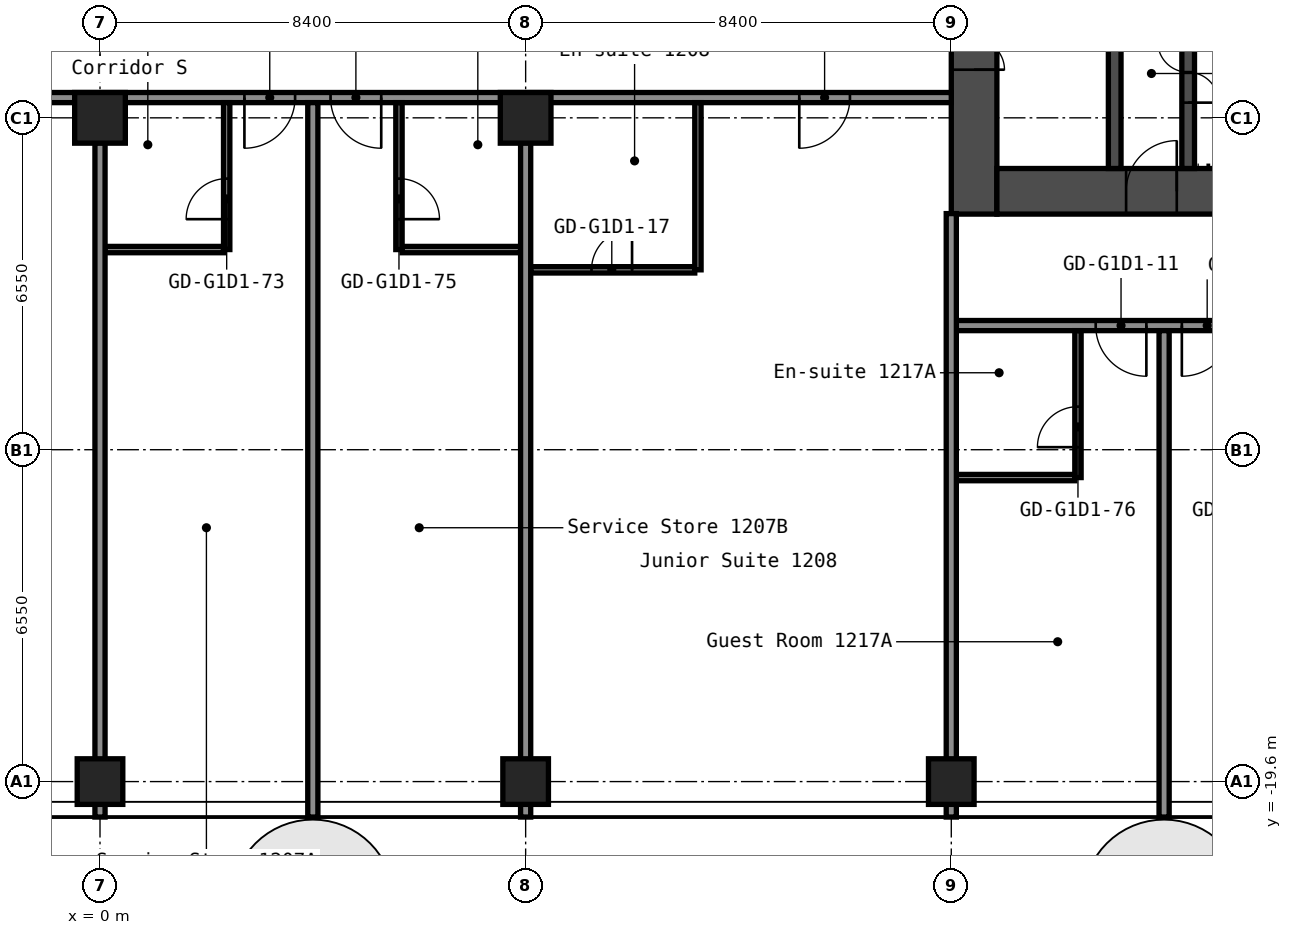
"""IFC4 building model, lengths in metres.
Left out: names, types, materials, properties, quantities, classifications, styles, units other than length and angle.
Written with IfcOpenShell. Run it as: python <this file> out.ifc"""

import sys

from ifc_helpers import new_model, si_unit, direction, frame, frame_2d, origin, origin_2d, place, context, subcontext, project, spatial, rectangle, hollow_rectangle, extrude, element, fill, save


model = new_model("IFC4")
c1 = context("Model", 3, precision=1e-05, world=origin(), true_north=direction((0.0, 1.0)))
c2 = subcontext(c1, "Body", "Model", "MODEL_VIEW")
j1 = project(units=[si_unit("LENGTHUNIT", "METRE"), si_unit("PLANEANGLEUNIT", "RADIAN")], contexts=[c1])
p1 = place(None, origin())
s1 = spatial("IfcSite", under=j1, at=p1, CompositionType="ELEMENT")
p2 = place(p1, origin())
s2 = spatial("IfcBuilding", under=s1, at=p2, CompositionType="ELEMENT")
p3 = place(p2, frame((0.0, 0.0, 45.4)))
s3 = spatial("IfcBuildingStorey", under=s2, at=p3, CompositionType="ELEMENT", Elevation=45.4)
p4 = place(p3, frame((0.0, -19.6, 0.0), z_axis=(0.0, 0.0, 1.0), x_axis=(1.0, 0.0, 0.0)))
e1 = element("IfcColumn", 1, at=p4, inside=s3, PredefinedType="COLUMN", context=c2, shape_type="SweptSolid", body=[
    extrude(hollow_rectangle(XDim=0.9, YDim=0.9, WallThickness=0.036, at=origin_2d()), origin(), (0.0, 0.0, 1.0), 2.8),
])
p5 = place(p3, frame((0.0, -6.5, 0.0), z_axis=(0.0, 0.0, 1.0), x_axis=(1.0, 0.0, 0.0)))
e2 = element("IfcColumn", 2, at=p5, inside=s3, PredefinedType="COLUMN", context=c2, shape_type="SweptSolid", body=[
    extrude(hollow_rectangle(XDim=1.0, YDim=1.0, WallThickness=0.04, at=origin_2d()), origin(), (0.0, 0.0, 1.0), 2.8),
])
p6 = place(p3, frame((8.4, -19.6, 0.0), z_axis=(0.0, 0.0, 1.0), x_axis=(1.0, 0.0, 0.0)))
e3 = element("IfcColumn", 3, at=p6, inside=s3, PredefinedType="COLUMN", context=c2, shape_type="SweptSolid", body=[
    extrude(hollow_rectangle(XDim=0.9, YDim=0.9, WallThickness=0.036, at=origin_2d()), origin(), (0.0, 0.0, 1.0), 2.8),
])
p7 = place(p3, frame((8.4, -6.5, 0.0), z_axis=(0.0, 0.0, 1.0), x_axis=(1.0, 0.0, 0.0)))
e4 = element("IfcColumn", 4, at=p7, inside=s3, PredefinedType="COLUMN", context=c2, shape_type="SweptSolid", body=[
    extrude(hollow_rectangle(XDim=1.0, YDim=1.0, WallThickness=0.04, at=origin_2d()), origin(), (0.0, 0.0, 1.0), 2.8),
])
p8 = place(p3, frame((16.8, -19.6, 0.0), z_axis=(0.0, 0.0, 1.0), x_axis=(1.0, 0.0, 0.0)))
e5 = element("IfcColumn", 5, at=p8, inside=s3, PredefinedType="COLUMN", context=c2, shape_type="SweptSolid", body=[
    extrude(hollow_rectangle(XDim=0.9, YDim=0.9, WallThickness=0.036, at=origin_2d()), origin(), (0.0, 0.0, 1.0), 2.8),
])
p9 = place(p3, frame((17.25, -8.4, 0.0), z_axis=(0.0, 0.0, 1.0), x_axis=(0.0, 1.0, 0.0)))
e6 = element("IfcWall", 6, at=p9, inside=s3, PredefinedType="SHEAR", context=c2, shape_type="SweptSolid", body=[
    extrude(rectangle(XDim=16.8, YDim=0.9, at=frame_2d((8.4, 0.0))), origin(), (0.0, 0.0, 1.0), 2.8),
])
p10 = place(p9, frame((12.75, 0.0, 0.0)))
e7 = element("IfcOpeningElement", 7, at=p10, cuts=e6, PredefinedType="OPENING", context=c2, shape_type="SweptSolid", body=[
    extrude(rectangle(XDim=1.2, YDim=2.1, at=frame_2d((0.6, 1.05))), frame((0.0, 0.46, 0.0), z_axis=(0.0, -1.0, 0.0), x_axis=(1.0, 0.0, 0.0)), (0.0, 0.0, 1.0), 0.92),
])
p11 = place(p9, frame((2.85, 0.0, 0.0)))
e8 = element("IfcOpeningElement", 8, at=p11, cuts=e6, PredefinedType="OPENING", context=c2, shape_type="SweptSolid", body=[
    extrude(rectangle(XDim=1.2, YDim=2.1, at=frame_2d((0.6, 1.05))), frame((0.0, 0.46, 0.0), z_axis=(0.0, -1.0, 0.0), x_axis=(1.0, 0.0, 0.0)), (0.0, 0.0, 1.0), 0.92),
])
p12 = place(p3, frame((17.7, -7.95, 0.0), z_axis=(0.0, 0.0, 1.0), x_axis=(1.0, 0.0, 0.0)))
e9 = element("IfcWall", 9, at=p12, inside=s3, PredefinedType="SHEAR", context=c2, shape_type="SweptSolid", body=[
    extrude(rectangle(XDim=15.0, YDim=0.9, at=frame_2d((7.5, 0.0))), origin(), (0.0, 0.0, 1.0), 2.8),
])
p13 = place(p12, frame((2.55, 0.0, 0.0)))
e10 = element("IfcOpeningElement", 10, at=p13, cuts=e9, PredefinedType="OPENING", context=c2, shape_type="SweptSolid", body=[
    extrude(rectangle(XDim=1.0, YDim=2.1, at=frame_2d((0.5, 1.05))), frame((0.0, 0.46, 0.0), z_axis=(0.0, -1.0, 0.0), x_axis=(1.0, 0.0, 0.0)), (0.0, 0.0, 1.0), 0.92),
])
p14 = place(p3, frame((20.025, -7.5, 0.0), z_axis=(0.0, 0.0, 1.0), x_axis=(0.0, 1.0, 0.0)))
e11 = element("IfcWall", 11, at=p14, inside=s3, PredefinedType="SHEAR", context=c2, shape_type="SweptSolid", body=[
    extrude(rectangle(XDim=6.3, YDim=0.25, at=frame_2d((3.15, 0.0))), origin(), (0.0, 0.0, 1.0), 2.8),
])
p15 = place(p14, frame((2.4, 0.0, 0.0)))
e12 = element("IfcOpeningElement", 12, at=p15, cuts=e11, PredefinedType="OPENING", context=c2, shape_type="SweptSolid", body=[
    extrude(rectangle(XDim=1.0, YDim=2.1, at=frame_2d((0.5, 1.05))), frame((0.0, 0.135, 0.0), z_axis=(0.0, -1.0, 0.0), x_axis=(1.0, 0.0, 0.0)), (0.0, 0.0, 1.0), 0.27),
])
p16 = place(p3, frame((21.475, -7.5, 0.0), z_axis=(0.0, 0.0, 1.0), x_axis=(0.0, 1.0, 0.0)))
e13 = element("IfcWall", 13, at=p16, inside=s3, PredefinedType="SHEAR", context=c2, shape_type="SweptSolid", body=[
    extrude(rectangle(XDim=3.75, YDim=0.25, at=frame_2d((1.875, 0.0))), origin(), (0.0, 0.0, 1.0), 2.8),
])
p17 = place(p16, frame((1.3, 0.0, 0.0)))
e14 = element("IfcOpeningElement", 14, at=p17, cuts=e13, PredefinedType="OPENING", context=c2, shape_type="SweptSolid", body=[
    extrude(rectangle(XDim=1.2, YDim=2.1, at=frame_2d((0.6, 1.05))), frame((0.0, 0.135, 0.0), z_axis=(0.0, -1.0, 0.0), x_axis=(1.0, 0.0, 0.0)), (0.0, 0.0, 1.0), 0.27),
])
p18 = place(p3, frame((16.9, -13.6, 0.0), z_axis=(0.0, 0.0, 1.0), x_axis=(1.0, 0.0, 0.0)))
e15 = element("IfcWall", 15, at=p18, inside=s3, PredefinedType="PARTITIONING", context=c2, shape_type="SweptSolid", body=[
    extrude(rectangle(XDim=2.338, YDim=0.125, at=frame_2d((1.169, 0.0))), origin(), (0.0, 0.0, 1.0), 2.8),
])
p19 = place(p3, frame((16.8, -10.6, 0.0), z_axis=(0.0, 0.0, 1.0), x_axis=(1.0, 0.0, 0.0)))
e16 = element("IfcWall", 16, at=p19, inside=s3, PredefinedType="PARTITIONING", context=c2, shape_type="SweptSolid", body=[
    extrude(rectangle(XDim=34.3, YDim=0.2, at=frame_2d((17.15, 0.0))), origin(), (0.0, 0.0, 1.0), 2.8),
])
p20 = place(p19, frame((2.85, 0.0, 0.0)))
e17 = element("IfcOpeningElement", 17, at=p20, cuts=e16, PredefinedType="OPENING", context=c2, shape_type="SweptSolid", body=[
    extrude(rectangle(XDim=1.0, YDim=2.1, at=frame_2d((0.5, 1.05))), frame((0.0, 0.11, 0.0), z_axis=(0.0, -1.0, 0.0), x_axis=(1.0, 0.0, 0.0)), (0.0, 0.0, 1.0), 0.22),
])
p21 = place(p19, frame((4.55, 0.0, 0.0)))
e18 = element("IfcOpeningElement", 18, at=p21, cuts=e16, PredefinedType="OPENING", context=c2, shape_type="SweptSolid", body=[
    extrude(rectangle(XDim=1.0, YDim=2.1, at=frame_2d((0.5, 1.05))), frame((0.0, 0.11, 0.0), z_axis=(0.0, -1.0, 0.0), x_axis=(1.0, 0.0, 0.0)), (0.0, 0.0, 1.0), 0.22),
])
p22 = place(p19, frame((10.4, 0.0, 0.0)))
e19 = element("IfcOpeningElement", 19, at=p22, cuts=e16, PredefinedType="OPENING", context=c2, shape_type="SweptSolid", body=[
    extrude(rectangle(XDim=1.0, YDim=2.1, at=frame_2d((0.5, 1.05))), frame((0.0, 0.11, 0.0), z_axis=(0.0, -1.0, 0.0), x_axis=(1.0, 0.0, 0.0)), (0.0, 0.0, 1.0), 0.22),
])
p23 = place(p19, frame((19.65, 0.0, 0.0)))
e20 = element("IfcOpeningElement", 20, at=p23, cuts=e16, PredefinedType="OPENING", context=c2, shape_type="SweptSolid", body=[
    extrude(rectangle(XDim=1.0, YDim=2.1, at=frame_2d((0.5, 1.05))), frame((0.0, 0.11, 0.0), z_axis=(0.0, -1.0, 0.0), x_axis=(1.0, 0.0, 0.0)), (0.0, 0.0, 1.0), 0.22),
])
p24 = place(p19, frame((21.35, 0.0, 0.0)))
e21 = element("IfcOpeningElement", 21, at=p24, cuts=e16, PredefinedType="OPENING", context=c2, shape_type="SweptSolid", body=[
    extrude(rectangle(XDim=1.0, YDim=2.1, at=frame_2d((0.5, 1.05))), frame((0.0, 0.11, 0.0), z_axis=(0.0, -1.0, 0.0), x_axis=(1.0, 0.0, 0.0)), (0.0, 0.0, 1.0), 0.22),
])
p25 = place(p19, frame((30.8, 0.0, 0.0)))
e22 = element("IfcOpeningElement", 22, at=p25, cuts=e16, PredefinedType="OPENING", context=c2, shape_type="SweptSolid", body=[
    extrude(rectangle(XDim=1.0, YDim=2.1, at=frame_2d((0.5, 1.05))), frame((0.0, 0.11, 0.0), z_axis=(0.0, -1.0, 0.0), x_axis=(1.0, 0.0, 0.0)), (0.0, 0.0, 1.0), 0.22),
])
p26 = place(p3, frame((8.5, -9.5, 0.0), z_axis=(0.0, 0.0, 1.0), x_axis=(1.0, 0.0, 0.0)))
e23 = element("IfcWall", 23, at=p26, inside=s3, PredefinedType="PARTITIONING", context=c2, shape_type="SweptSolid", body=[
    extrude(rectangle(XDim=3.238, YDim=0.125, at=frame_2d((1.619, 0.0))), origin(), (0.0, 0.0, 1.0), 2.8),
])
p27 = place(p26, frame((1.2, 0.0, 0.0)))
e24 = element("IfcOpeningElement", 24, at=p27, cuts=e23, PredefinedType="OPENING", context=c2, shape_type="SweptSolid", body=[
    extrude(rectangle(XDim=0.8, YDim=2.1, at=frame_2d((0.4, 1.05))), frame((0.0, 0.073, 0.0), z_axis=(0.0, -1.0, 0.0), x_axis=(1.0, 0.0, 0.0)), (0.0, 0.0, 1.0), 0.145),
])
p28 = place(p3, frame((0.1, -9.1, 0.0), z_axis=(0.0, 0.0, 1.0), x_axis=(1.0, 0.0, 0.0)))
e25 = element("IfcWall", 25, at=p28, inside=s3, PredefinedType="PARTITIONING", context=c2, shape_type="SweptSolid", body=[
    extrude(rectangle(XDim=2.337, YDim=0.125, at=frame_2d((1.169, 0.0))), origin(), (0.0, 0.0, 1.0), 2.8),
])
p29 = place(p3, frame((5.962, -9.1, 0.0), z_axis=(0.0, 0.0, 1.0), x_axis=(1.0, 0.0, 0.0)))
e26 = element("IfcWall", 26, at=p29, inside=s3, PredefinedType="PARTITIONING", context=c2, shape_type="SweptSolid", body=[
    extrude(rectangle(XDim=2.338, YDim=0.125, at=frame_2d((1.169, 0.0))), origin(), (0.0, 0.0, 1.0), 2.8),
])
p30 = place(p3, frame((-16.8, -6.1, 0.0), z_axis=(0.0, 0.0, 1.0), x_axis=(1.0, 0.0, 0.0)))
e27 = element("IfcWall", 27, at=p30, inside=s3, PredefinedType="PARTITIONING", context=c2, shape_type="SweptSolid", body=[
    extrude(rectangle(XDim=33.6, YDim=0.2, at=frame_2d((16.8, 0.0))), origin(), (0.0, 0.0, 1.0), 2.8),
])
p31 = place(p30, frame((2.85, 0.0, 0.0)))
e28 = element("IfcOpeningElement", 28, at=p31, cuts=e27, PredefinedType="OPENING", context=c2, shape_type="SweptSolid", body=[
    extrude(rectangle(XDim=1.0, YDim=2.1, at=frame_2d((0.5, 1.05))), frame((0.0, 0.11, 0.0), z_axis=(0.0, -1.0, 0.0), x_axis=(1.0, 0.0, 0.0)), (0.0, 0.0, 1.0), 0.22),
])
p32 = place(p30, frame((4.55, 0.0, 0.0)))
e29 = element("IfcOpeningElement", 29, at=p32, cuts=e27, PredefinedType="OPENING", context=c2, shape_type="SweptSolid", body=[
    extrude(rectangle(XDim=1.0, YDim=2.1, at=frame_2d((0.5, 1.05))), frame((0.0, 0.11, 0.0), z_axis=(0.0, -1.0, 0.0), x_axis=(1.0, 0.0, 0.0)), (0.0, 0.0, 1.0), 0.22),
])
p33 = place(p30, frame((10.3, 0.0, 0.0)))
e30 = element("IfcOpeningElement", 30, at=p33, cuts=e27, PredefinedType="OPENING", context=c2, shape_type="SweptSolid", body=[
    extrude(rectangle(XDim=0.9, YDim=2.1, at=frame_2d((0.45, 1.05))), frame((0.0, 0.11, 0.0), z_axis=(0.0, -1.0, 0.0), x_axis=(1.0, 0.0, 0.0)), (0.0, 0.0, 1.0), 0.22),
])
p34 = place(p30, frame((14.5, 0.0, 0.0)))
e31 = element("IfcOpeningElement", 31, at=p34, cuts=e27, PredefinedType="OPENING", context=c2, shape_type="SweptSolid", body=[
    extrude(rectangle(XDim=0.9, YDim=2.1, at=frame_2d((0.45, 1.05))), frame((0.0, 0.11, 0.0), z_axis=(0.0, -1.0, 0.0), x_axis=(1.0, 0.0, 0.0)), (0.0, 0.0, 1.0), 0.22),
])
p35 = place(p30, frame((19.65, 0.0, 0.0)))
e32 = element("IfcOpeningElement", 32, at=p35, cuts=e27, PredefinedType="OPENING", context=c2, shape_type="SweptSolid", body=[
    extrude(rectangle(XDim=1.0, YDim=2.1, at=frame_2d((0.5, 1.05))), frame((0.0, 0.11, 0.0), z_axis=(0.0, -1.0, 0.0), x_axis=(1.0, 0.0, 0.0)), (0.0, 0.0, 1.0), 0.22),
])
p36 = place(p30, frame((21.35, 0.0, 0.0)))
e33 = element("IfcOpeningElement", 33, at=p36, cuts=e27, PredefinedType="OPENING", context=c2, shape_type="SweptSolid", body=[
    extrude(rectangle(XDim=1.0, YDim=2.1, at=frame_2d((0.5, 1.05))), frame((0.0, 0.11, 0.0), z_axis=(0.0, -1.0, 0.0), x_axis=(1.0, 0.0, 0.0)), (0.0, 0.0, 1.0), 0.22),
])
p37 = place(p30, frame((30.6, 0.0, 0.0)))
e34 = element("IfcOpeningElement", 34, at=p37, cuts=e27, PredefinedType="OPENING", context=c2, shape_type="SweptSolid", body=[
    extrude(rectangle(XDim=1.0, YDim=2.1, at=frame_2d((0.5, 1.05))), frame((0.0, 0.11, 0.0), z_axis=(0.0, -1.0, 0.0), x_axis=(1.0, 0.0, 0.0)), (0.0, 0.0, 1.0), 0.22),
])
p38 = place(p3, frame((0.0, -20.3, 0.0), z_axis=(0.0, 0.0, 1.0), x_axis=(0.0, 1.0, 0.0)))
e35 = element("IfcWall", 35, at=p38, inside=s3, PredefinedType="PARTITIONING", context=c2, shape_type="SweptSolid", body=[
    extrude(rectangle(XDim=13.31, YDim=0.2, at=frame_2d((6.655, 0.0))), origin(), (0.0, 0.0, 1.0), 2.8),
])
p39 = place(p3, frame((2.5, -9.1, 0.0), z_axis=(0.0, 0.0, 1.0), x_axis=(0.0, 1.0, 0.0)))
e36 = element("IfcWall", 36, at=p39, inside=s3, PredefinedType="PARTITIONING", context=c2, shape_type="SweptSolid", body=[
    extrude(rectangle(XDim=2.9, YDim=0.125, at=frame_2d((1.45, 0.0))), origin(), (0.0, 0.0, 1.0), 2.8),
])
p40 = place(p39, frame((0.6, 0.0, 0.0)))
e37 = element("IfcOpeningElement", 37, at=p40, cuts=e36, PredefinedType="OPENING", context=c2, shape_type="SweptSolid", body=[
    extrude(rectangle(XDim=0.8, YDim=2.1, at=frame_2d((0.4, 1.05))), frame((0.0, 0.073, 0.0), z_axis=(0.0, -1.0, 0.0), x_axis=(1.0, 0.0, 0.0)), (0.0, 0.0, 1.0), 0.145),
])
p41 = place(p3, frame((4.2, -20.3, 0.0), z_axis=(0.0, 0.0, 1.0), x_axis=(0.0, 1.0, 0.0)))
e38 = element("IfcWall", 38, at=p41, inside=s3, PredefinedType="PARTITIONING", context=c2, shape_type="SweptSolid", body=[
    extrude(rectangle(XDim=14.1, YDim=0.2, at=frame_2d((7.05, 0.0))), origin(), (0.0, 0.0, 1.0), 2.8),
])
p42 = place(p3, frame((5.9, -9.1, 0.0), z_axis=(0.0, 0.0, 1.0), x_axis=(0.0, 1.0, 0.0)))
e39 = element("IfcWall", 39, at=p42, inside=s3, PredefinedType="PARTITIONING", context=c2, shape_type="SweptSolid", body=[
    extrude(rectangle(XDim=2.9, YDim=0.125, at=frame_2d((1.45, 0.0))), origin(), (0.0, 0.0, 1.0), 2.8),
])
p43 = place(p42, frame((0.6, 0.0, 0.0)))
e40 = element("IfcOpeningElement", 40, at=p43, cuts=e39, PredefinedType="OPENING", context=c2, shape_type="SweptSolid", body=[
    extrude(rectangle(XDim=0.8, YDim=2.1, at=frame_2d((0.4, 1.05))), frame((0.0, 0.073, 0.0), z_axis=(0.0, -1.0, 0.0), x_axis=(1.0, 0.0, 0.0)), (0.0, 0.0, 1.0), 0.145),
])
p44 = place(p3, frame((8.4, -20.3, 0.0), z_axis=(0.0, 0.0, 1.0), x_axis=(0.0, 1.0, 0.0)))
e41 = element("IfcWall", 41, at=p44, inside=s3, PredefinedType="PARTITIONING", context=c2, shape_type="SweptSolid", body=[
    extrude(rectangle(XDim=13.31, YDim=0.2, at=frame_2d((6.655, 0.0))), origin(), (0.0, 0.0, 1.0), 2.8),
])
p45 = place(p3, frame((11.8, -9.5, 0.0), z_axis=(0.0, 0.0, 1.0), x_axis=(0.0, 1.0, 0.0)))
e42 = element("IfcWall", 42, at=p45, inside=s3, PredefinedType="PARTITIONING", context=c2, shape_type="SweptSolid", body=[
    extrude(rectangle(XDim=3.3, YDim=0.125, at=frame_2d((1.65, 0.0))), origin(), (0.0, 0.0, 1.0), 2.8),
])
p46 = place(p3, frame((16.8, -20.3, 0.0), z_axis=(0.0, 0.0, 1.0), x_axis=(0.0, 1.0, 0.0)))
e43 = element("IfcWall", 43, at=p46, inside=s3, PredefinedType="PARTITIONING", context=c2, shape_type="SweptSolid", body=[
    extrude(rectangle(XDim=11.91, YDim=0.2, at=frame_2d((5.955, 0.0))), origin(), (0.0, 0.0, 1.0), 2.8),
])
p47 = place(p3, frame((19.3, -13.6, 0.0), z_axis=(0.0, 0.0, 1.0), x_axis=(0.0, 1.0, 0.0)))
e44 = element("IfcWall", 44, at=p47, inside=s3, PredefinedType="PARTITIONING", context=c2, shape_type="SweptSolid", body=[
    extrude(rectangle(XDim=2.9, YDim=0.125, at=frame_2d((1.45, 0.0))), origin(), (0.0, 0.0, 1.0), 2.8),
])
p48 = place(p47, frame((0.6, 0.0, 0.0)))
e45 = element("IfcOpeningElement", 45, at=p48, cuts=e44, PredefinedType="OPENING", context=c2, shape_type="SweptSolid", body=[
    extrude(rectangle(XDim=0.8, YDim=2.1, at=frame_2d((0.4, 1.05))), frame((0.0, 0.073, 0.0), z_axis=(0.0, -1.0, 0.0), x_axis=(1.0, 0.0, 0.0)), (0.0, 0.0, 1.0), 0.145),
])
p49 = place(p3, frame((21.0, -20.3, 0.0), z_axis=(0.0, 0.0, 1.0), x_axis=(0.0, 1.0, 0.0)))
e46 = element("IfcWall", 46, at=p49, inside=s3, PredefinedType="PARTITIONING", context=c2, shape_type="SweptSolid", body=[
    extrude(rectangle(XDim=9.6, YDim=0.2, at=frame_2d((4.8, 0.0))), origin(), (0.0, 0.0, 1.0), 2.8),
])
p50 = place(p11, origin())
e47 = element("IfcDoor", 47, at=p50, inside=s3, OperationType="DOUBLE_DOOR_SINGLE_SWING", PredefinedType="DOOR", context=c2, shape_type="SweptSolid", body=[
    extrude(rectangle(XDim=1.2, YDim=2.1, at=frame_2d((0.6, 1.05))), frame((0.0, 0.025, 0.0), z_axis=(0.0, -1.0, 0.0), x_axis=(1.0, 0.0, 0.0)), (0.0, 0.0, 1.0), 0.05),
])
fill(e8, e47)
p51 = place(p13, origin())
e48 = element("IfcDoor", 48, at=p51, inside=s3, OperationType="SINGLE_SWING_LEFT", PredefinedType="DOOR", context=c2, shape_type="SweptSolid", body=[
    extrude(rectangle(XDim=1.0, YDim=2.1, at=frame_2d((0.5, 1.05))), frame((0.0, 0.025, 0.0), z_axis=(0.0, -1.0, 0.0), x_axis=(1.0, 0.0, 0.0)), (0.0, 0.0, 1.0), 0.05),
])
fill(e10, e48)
p52 = place(p17, origin())
e49 = element("IfcDoor", 49, at=p52, inside=s3, OperationType="DOUBLE_DOOR_SINGLE_SWING", PredefinedType="DOOR", context=c2, shape_type="SweptSolid", body=[
    extrude(rectangle(XDim=1.2, YDim=2.1, at=frame_2d((0.6, 1.05))), frame((0.0, 0.025, 0.0), z_axis=(0.0, -1.0, 0.0), x_axis=(1.0, 0.0, 0.0)), (0.0, 0.0, 1.0), 0.05),
])
fill(e14, e49)
p53 = place(p20, origin())
e50 = element("IfcDoor", 50, at=p53, inside=s3, OperationType="SINGLE_SWING_RIGHT", PredefinedType="DOOR", context=c2, shape_type="SweptSolid", body=[
    extrude(rectangle(XDim=1.0, YDim=2.1, at=frame_2d((0.5, 1.05))), frame((0.0, 0.025, 0.0), z_axis=(0.0, -1.0, 0.0), x_axis=(1.0, 0.0, 0.0)), (0.0, 0.0, 1.0), 0.05),
])
fill(e17, e50)
p54 = place(p21, origin())
e51 = element("IfcDoor", 51, at=p54, inside=s3, OperationType="SINGLE_SWING_LEFT", PredefinedType="DOOR", context=c2, shape_type="SweptSolid", body=[
    extrude(rectangle(XDim=1.0, YDim=2.1, at=frame_2d((0.5, 1.05))), frame((0.0, 0.025, 0.0), z_axis=(0.0, -1.0, 0.0), x_axis=(1.0, 0.0, 0.0)), (0.0, 0.0, 1.0), 0.05),
])
fill(e18, e51)
p55 = place(p27, origin())
e52 = element("IfcDoor", 52, at=p55, inside=s3, OperationType="SINGLE_SWING_LEFT", PredefinedType="DOOR", context=c2, shape_type="SweptSolid", body=[
    extrude(rectangle(XDim=0.8, YDim=2.1, at=frame_2d((0.4, 1.05))), frame((0.0, 0.025, 0.0), z_axis=(0.0, -1.0, 0.0), x_axis=(1.0, 0.0, 0.0)), (0.0, 0.0, 1.0), 0.05),
])
fill(e24, e52)
p56 = place(p35, origin())
e53 = element("IfcDoor", 53, at=p56, inside=s3, OperationType="SINGLE_SWING_LEFT", PredefinedType="DOOR", context=c2, shape_type="SweptSolid", body=[
    extrude(rectangle(XDim=1.0, YDim=2.1, at=frame_2d((0.5, 1.05))), frame((0.0, 0.025, 0.0), z_axis=(0.0, -1.0, 0.0), x_axis=(1.0, 0.0, 0.0)), (0.0, 0.0, 1.0), 0.05),
])
fill(e32, e53)
p57 = place(p36, origin())
e54 = element("IfcDoor", 54, at=p57, inside=s3, OperationType="SINGLE_SWING_RIGHT", PredefinedType="DOOR", context=c2, shape_type="SweptSolid", body=[
    extrude(rectangle(XDim=1.0, YDim=2.1, at=frame_2d((0.5, 1.05))), frame((0.0, 0.025, 0.0), z_axis=(0.0, -1.0, 0.0), x_axis=(1.0, 0.0, 0.0)), (0.0, 0.0, 1.0), 0.05),
])
fill(e33, e54)
p58 = place(p37, origin())
e55 = element("IfcDoor", 55, at=p58, inside=s3, OperationType="SINGLE_SWING_LEFT", PredefinedType="DOOR", context=c2, shape_type="SweptSolid", body=[
    extrude(rectangle(XDim=1.0, YDim=2.1, at=frame_2d((0.5, 1.05))), frame((0.0, 0.025, 0.0), z_axis=(0.0, -1.0, 0.0), x_axis=(1.0, 0.0, 0.0)), (0.0, 0.0, 1.0), 0.05),
])
fill(e34, e55)
p59 = place(p40, origin())
e56 = element("IfcDoor", 56, at=p59, inside=s3, OperationType="SINGLE_SWING_RIGHT", PredefinedType="DOOR", context=c2, shape_type="SweptSolid", body=[
    extrude(rectangle(XDim=0.8, YDim=2.1, at=frame_2d((0.4, 1.05))), frame((0.0, 0.025, 0.0), z_axis=(0.0, -1.0, 0.0), x_axis=(1.0, 0.0, 0.0)), (0.0, 0.0, 1.0), 0.05),
])
fill(e37, e56)
p60 = place(p43, origin())
e57 = element("IfcDoor", 57, at=p60, inside=s3, OperationType="SINGLE_SWING_LEFT", PredefinedType="DOOR", context=c2, shape_type="SweptSolid", body=[
    extrude(rectangle(XDim=0.8, YDim=2.1, at=frame_2d((0.4, 1.05))), frame((0.0, 0.025, 0.0), z_axis=(0.0, -1.0, 0.0), x_axis=(1.0, 0.0, 0.0)), (0.0, 0.0, 1.0), 0.05),
])
fill(e40, e57)
p61 = place(p48, origin())
e58 = element("IfcDoor", 58, at=p61, inside=s3, OperationType="SINGLE_SWING_RIGHT", PredefinedType="DOOR", context=c2, shape_type="SweptSolid", body=[
    extrude(rectangle(XDim=0.8, YDim=2.1, at=frame_2d((0.4, 1.05))), frame((0.0, 0.025, 0.0), z_axis=(0.0, -1.0, 0.0), x_axis=(1.0, 0.0, 0.0)), (0.0, 0.0, 1.0), 0.05),
])
fill(e45, e58)
save(model, sys.argv[1])
